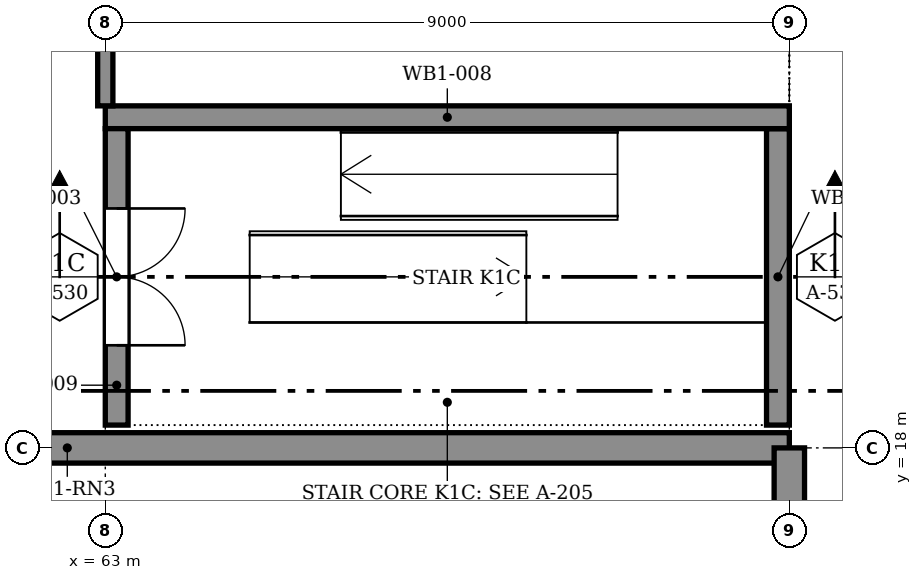
"""IFC4 building model, lengths in metres.
Left out: names, types, materials, properties, quantities, classifications, styles, units other than length and angle.
Written with IfcOpenShell. Run it as: python <this file> out.ifc"""

import sys

from ifc_helpers import new_model, si_unit, direction, frame, frame_2d, origin, place, context, subcontext, project, spatial, rectangle, extrude, element, fill, save


model = new_model("IFC4")
c1 = context("Model", 3, precision=1e-05, world=origin(), true_north=direction((0.0, 1.0)))
c2 = subcontext(c1, "Body", "Model", "MODEL_VIEW")
j1 = project(units=[si_unit("LENGTHUNIT", "METRE"), si_unit("PLANEANGLEUNIT", "RADIAN")], contexts=[c1])
p1 = place(None, origin())
s1 = spatial("IfcSite", under=j1, at=p1, CompositionType="ELEMENT")
p2 = place(p1, origin())
s2 = spatial("IfcBuilding", under=s1, at=p2, CompositionType="ELEMENT")
p3 = place(p2, frame((0.0, 0.0, -4.8)))
s3 = spatial("IfcBuildingStorey", under=s2, at=p3, CompositionType="ELEMENT", Elevation=-4.8)
p4 = place(p3, frame((27.0, 18.0, 0.0), z_axis=(0.0, 0.0, 1.0), x_axis=(1.0, 0.0, 0.0)))
e1 = element("IfcWall", 1, at=p4, inside=s3, PredefinedType="SOLIDWALL", context=c2, shape_type="SweptSolid", body=[
    extrude(rectangle(XDim=45.0, YDim=0.4, at=frame_2d((22.5, 0.0))), origin(), (0.0, 0.0, 1.0), 4.8),
])
p5 = place(p3, frame((72.0, 0.0, 0.0), z_axis=(0.0, 0.0, 1.0), x_axis=(0.0, 1.0, 0.0)))
e2 = element("IfcWall", 2, at=p5, inside=s3, PredefinedType="SOLIDWALL", context=c2, shape_type="SweptSolid", body=[
    extrude(rectangle(XDim=18.0, YDim=0.4, at=frame_2d((9.0, 0.0))), origin(), (0.0, 0.0, 1.0), 4.8),
])
p6 = place(p3, frame((71.85, 18.3, 0.0), z_axis=(0.0, 0.0, 1.0), x_axis=(0.0, 1.0, 0.0)))
e3 = element("IfcWall", 3, at=p6, inside=s3, PredefinedType="SOLIDWALL", context=c2, shape_type="SweptSolid", body=[
    extrude(rectangle(XDim=3.9, YDim=0.3, at=frame_2d((1.95, 0.0))), origin(), (0.0, 0.0, 1.0), 4.8),
])
p7 = place(p3, frame((63.0, 22.35, 0.0), z_axis=(0.0, 0.0, 1.0), x_axis=(1.0, 0.0, 0.0)))
e4 = element("IfcWall", 4, at=p7, inside=s3, PredefinedType="SOLIDWALL", context=c2, shape_type="SweptSolid", body=[
    extrude(rectangle(XDim=9.0, YDim=0.3, at=frame_2d((4.5, 0.0))), origin(), (0.0, 0.0, 1.0), 4.8),
])
p8 = place(p3, frame((63.15, 18.3, 0.0), z_axis=(0.0, 0.0, 1.0), x_axis=(0.0, 1.0, 0.0)))
e5 = element("IfcWall", 5, at=p8, inside=s3, PredefinedType="SOLIDWALL", context=c2, shape_type="SweptSolid", body=[
    extrude(rectangle(XDim=3.9, YDim=0.3, at=frame_2d((1.95, 0.0))), origin(), (0.0, 0.0, 1.0), 4.8),
])
p9 = place(p8, frame((1.05, 0.0, 0.0)))
e6 = element("IfcOpeningElement", 6, at=p9, cuts=e5, PredefinedType="OPENING", context=c2, shape_type="SweptSolid", body=[
    extrude(rectangle(XDim=1.8, YDim=2.1, at=frame_2d((0.9, 1.05))), frame((0.0, 0.16, 0.0), z_axis=(0.0, -1.0, 0.0), x_axis=(1.0, 0.0, 0.0)), (0.0, 0.0, 1.0), 0.32),
])
p10 = place(p3, frame((63.0, 22.5, 0.0), z_axis=(0.0, 0.0, 1.0), x_axis=(0.0, 1.0, 0.0)))
e7 = element("IfcWall", 7, at=p10, inside=s3, PredefinedType="PARTITIONING", context=c2, shape_type="SweptSolid", body=[
    extrude(rectangle(XDim=4.331, YDim=0.2, at=frame_2d((2.165, 0.0))), origin(), (0.0, 0.0, 1.0), 4.023),
])
p11 = place(p10, frame((0.95, 0.0, 0.0)))
e8 = element("IfcOpeningElement", 8, at=p11, cuts=e7, PredefinedType="OPENING", context=c2, shape_type="SweptSolid", body=[
    extrude(rectangle(XDim=2.4, YDim=2.4, at=frame_2d((1.2, 1.2))), frame((0.0, 0.11, 0.0), z_axis=(0.0, -1.0, 0.0), x_axis=(1.0, 0.0, 0.0)), (0.0, 0.0, 1.0), 0.22),
])
p12 = place(p9, frame((1.8, 0.0, 0.0), z_axis=(0.0, 0.0, 1.0), x_axis=(-1.0, 0.0, 0.0)))
e9 = element("IfcDoor", 9, at=p12, inside=s3, OperationType="DOUBLE_DOOR_SINGLE_SWING", PredefinedType="DOOR", context=c2, shape_type="SweptSolid", body=[
    extrude(rectangle(XDim=1.8, YDim=2.1, at=frame_2d((0.9, 1.05))), frame((0.0, 0.025, 0.0), z_axis=(0.0, -1.0, 0.0), x_axis=(1.0, 0.0, 0.0)), (0.0, 0.0, 1.0), 0.05),
])
fill(e6, e9)
save(model, sys.argv[1])
